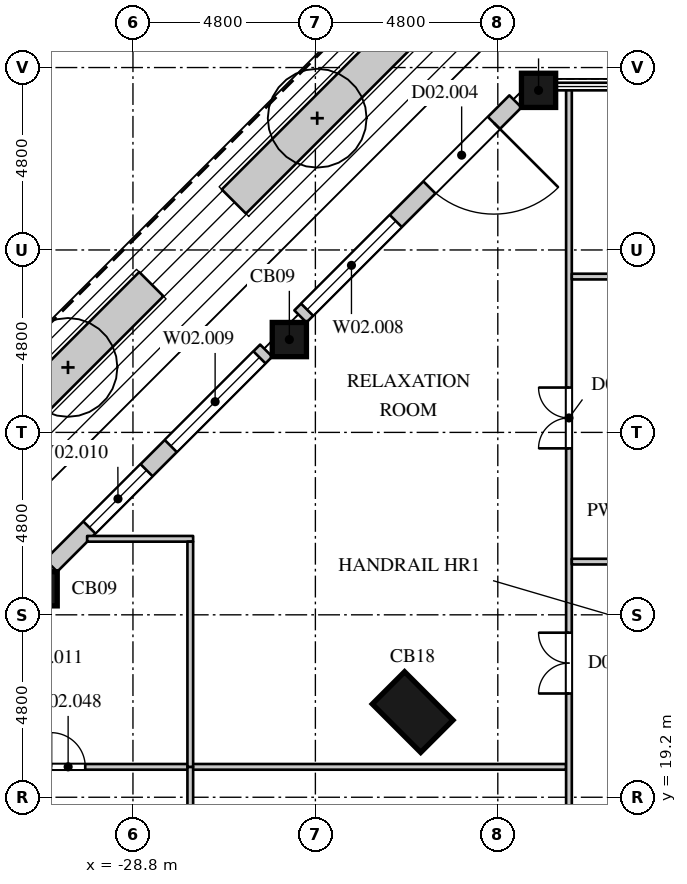
"""IFC4 building model, lengths in metres.
Left out: names, types, materials, properties, quantities, classifications, styles, units other than length and angle.
Written with IfcOpenShell. Run it as: python <this file> out.ifc"""

import sys

from ifc_helpers import new_model, si_unit, direction, frame, frame_2d, origin, origin_2d, place, context, subcontext, project, spatial, rectangle, extrude, element, fill, save


model = new_model("IFC4")
c1 = context("Model", 3, precision=1e-05, world=origin(), true_north=direction((0.0, 1.0)))
c2 = subcontext(c1, "Body", "Model", "MODEL_VIEW")
j1 = project(units=[si_unit("LENGTHUNIT", "METRE"), si_unit("PLANEANGLEUNIT", "RADIAN")], contexts=[c1])
p1 = place(None, origin())
s1 = spatial("IfcSite", under=j1, at=p1, CompositionType="ELEMENT")
p2 = place(p1, origin())
s2 = spatial("IfcBuilding", under=s1, at=p2, CompositionType="ELEMENT")
p3 = place(p2, frame((0.0, 0.0, 11.0)))
s3 = spatial("IfcBuildingStorey", under=s2, at=p3, CompositionType="ELEMENT", Elevation=11.0)
p4 = place(p3, frame((-21.441, 21.441, 0.0), z_axis=(0.0, 0.0, 1.0), x_axis=(-0.707106781187, -0.707106781187, 0.0)))
e1 = element("IfcColumn", 1, at=p4, inside=s3, PredefinedType="COLUMN", context=c2, shape_type="SweptSolid", body=[
    extrude(rectangle(XDim=1.2, YDim=1.8, at=origin_2d()), origin(), (0.0, 0.0, 1.0), 5.0),
])
for number, where, z_axis, x_axis in (
    (2, (-31.243, 24.685, 0.0), (0.0, 0.0, 1.0), (1.0, 0.0, 0.0)),
    (3, (-24.685, 31.243, 0.0), (0.0, 0.0, 1.0), (1.0, 0.0, 0.0)),
    (4, (-18.128, 37.8, 0.0), (0.0, 0.0, 1.0), (1.0, 0.0, 0.0)),
):
    element("IfcColumn", number, at=place(p3, frame(where, z_axis=z_axis, x_axis=x_axis)), inside=s3, PredefinedType="COLUMN", context=c2, shape_type="SweptSolid", body=[
        extrude(rectangle(XDim=0.9, YDim=0.9, at=origin_2d()), origin(), (0.0, 0.0, 1.0), 5.0),
    ])
p5 = place(p3, frame((-18.737, 37.509, 0.0), z_axis=(0.0, 0.0, 1.0), x_axis=(-0.707106781187, -0.707106781187, 0.0)))
e5 = element("IfcWall", 5, at=p5, inside=s3, PredefinedType="ELEMENTEDWALL", context=c2, shape_type="SweptSolid", body=[
    extrude(rectangle(XDim=8.0, YDim=0.45, at=frame_2d((4.0, 0.0))), origin(), (0.0, 0.0, 1.0), 3.8),
])
p6 = place(p5, frame((0.8, 0.0, 0.0)))
e6 = element("IfcOpeningElement", 6, at=p6, cuts=e5, PredefinedType="OPENING", context=c2, shape_type="SweptSolid", body=[
    extrude(rectangle(XDim=2.4, YDim=2.7, at=frame_2d((1.2, 1.35))), frame((0.0, 0.235, 0.0), z_axis=(0.0, -1.0, 0.0), x_axis=(1.0, 0.0, 0.0)), (0.0, 0.0, 1.0), 0.47),
])
p7 = place(p5, frame((4.45, 0.0, 1.05)))
e7 = element("IfcOpeningElement", 7, at=p7, cuts=e5, PredefinedType="OPENING", context=c2, shape_type="SweptSolid", body=[
    extrude(rectangle(XDim=3.3, YDim=2.7, at=frame_2d((1.65, 1.35))), frame((0.0, 0.235, 0.0), z_axis=(0.0, -1.0, 0.0), x_axis=(1.0, 0.0, 0.0)), (0.0, 0.0, 1.0), 0.47),
])
p8 = place(p3, frame((-25.294, 30.952, 0.0), z_axis=(0.0, 0.0, 1.0), x_axis=(-0.707106781187, -0.707106781187, 0.0)))
e8 = element("IfcWall", 8, at=p8, inside=s3, PredefinedType="ELEMENTEDWALL", context=c2, shape_type="SweptSolid", body=[
    extrude(rectangle(XDim=8.0, YDim=0.45, at=frame_2d((4.0, 0.0))), origin(), (0.0, 0.0, 1.0), 3.8),
])
p9 = place(p8, frame((0.25, 0.0, 1.05)))
e9 = element("IfcOpeningElement", 9, at=p9, cuts=e8, PredefinedType="OPENING", context=c2, shape_type="SweptSolid", body=[
    extrude(rectangle(XDim=3.3, YDim=2.7, at=frame_2d((1.65, 1.35))), frame((0.0, 0.235, 0.0), z_axis=(0.0, -1.0, 0.0), x_axis=(1.0, 0.0, 0.0)), (0.0, 0.0, 1.0), 0.47),
])
p10 = place(p8, frame((4.45, 0.0, 1.05)))
e10 = element("IfcOpeningElement", 10, at=p10, cuts=e8, PredefinedType="OPENING", context=c2, shape_type="SweptSolid", body=[
    extrude(rectangle(XDim=2.13, YDim=2.7, at=frame_2d((1.065, 1.35))), frame((0.0, 0.235, 0.0), z_axis=(0.0, -1.0, 0.0), x_axis=(1.0, 0.0, 0.0)), (0.0, 0.0, 1.0), 0.47),
])
p11 = place(p3, frame((-21.76, 39.259, 0.0), z_axis=(0.0, 0.0, 1.0), x_axis=(-0.707087094764, -0.707126467061, 0.0)))
e11 = element("IfcWall", 11, at=p11, inside=s3, PredefinedType="USERDEFINED", context=c2, shape_type="SweptSolid", body=[
    extrude(rectangle(XDim=6.201, YDim=0.9, at=frame_2d((3.101, 0.0))), origin(), (0.0, 0.0, 1.0), 0.9),
])
p12 = place(p3, frame((-28.317, 32.702, 0.0), z_axis=(0.0, 0.0, 1.0), x_axis=(-0.707106781187, -0.707106781187, 0.0)))
e12 = element("IfcWall", 12, at=p12, inside=s3, PredefinedType="USERDEFINED", context=c2, shape_type="SweptSolid", body=[
    extrude(rectangle(XDim=6.201, YDim=0.9, at=frame_2d((3.1, 0.0))), origin(), (0.0, 0.0, 1.0), 0.9),
])
p13 = place(p3, frame((-36.006, 20.0, 0.0), z_axis=(0.0, 0.0, 1.0), x_axis=(1.0, 0.0, 0.0)))
e13 = element("IfcWall", 13, at=p13, inside=s3, PredefinedType="PARTITIONING", context=c2, shape_type="SweptSolid", body=[
    extrude(rectangle(XDim=18.603, YDim=0.15, at=frame_2d((9.301, 0.0))), origin(), (0.0, 0.0, 1.0), 4.65),
])
p14 = place(p13, frame((1.2, 0.0, 0.0)))
e14 = element("IfcOpeningElement", 14, at=p14, cuts=e13, PredefinedType="OPENING", context=c2, shape_type="SweptSolid", body=[
    extrude(rectangle(XDim=0.9, YDim=2.2, at=frame_2d((0.45, 1.1))), frame((0.0, 0.085, 0.0), z_axis=(0.0, -1.0, 0.0), x_axis=(1.0, 0.0, 0.0)), (0.0, 0.0, 1.0), 0.17),
])
p15 = place(p13, frame((5.05, 0.0, 0.0)))
e15 = element("IfcOpeningElement", 15, at=p15, cuts=e13, PredefinedType="OPENING", context=c2, shape_type="SweptSolid", body=[
    extrude(rectangle(XDim=0.9, YDim=2.2, at=frame_2d((0.45, 1.1))), frame((0.0, 0.085, 0.0), z_axis=(0.0, -1.0, 0.0), x_axis=(1.0, 0.0, 0.0)), (0.0, 0.0, 1.0), 0.17),
])
p16 = place(p3, frame((-30.006, 26.0, 0.0), z_axis=(0.0, 0.0, 1.0), x_axis=(1.0, 0.0, 0.0)))
e16 = element("IfcWall", 16, at=p16, inside=s3, PredefinedType="PARTITIONING", context=c2, shape_type="SweptSolid", body=[
    extrude(rectangle(XDim=2.789, YDim=0.15, at=frame_2d((1.395, 0.0))), origin(), (0.0, 0.0, 1.0), 4.65),
])
p17 = place(p3, frame((-27.292, 11.325, 0.0), z_axis=(0.0, 0.0, 1.0), x_axis=(0.0, 1.0, 0.0)))
e17 = element("IfcWall", 17, at=p17, inside=s3, PredefinedType="PARTITIONING", context=c2, shape_type="SweptSolid", body=[
    extrude(rectangle(XDim=8.675, YDim=0.15, at=frame_2d((4.337, 0.0))), origin(), (0.0, 0.0, 1.0), 4.65),
])
p18 = place(p3, frame((-27.292, 20.0, 0.0), z_axis=(0.0, 0.0, 1.0), x_axis=(0.0, 1.0, 0.0)))
e18 = element("IfcWall", 18, at=p18, inside=s3, PredefinedType="PARTITIONING", context=c2, shape_type="SweptSolid", body=[
    extrude(rectangle(XDim=5.925, YDim=0.15, at=frame_2d((2.962, 0.0))), origin(), (0.0, 0.0, 1.0), 4.65),
])
p19 = place(p3, frame((-17.328, 15.58, 0.0), z_axis=(0.0, 0.0, 1.0), x_axis=(0.0, 1.0, 0.0)))
e19 = element("IfcWall", 19, at=p19, inside=s3, PredefinedType="PARTITIONING", context=c2, shape_type="SweptSolid", body=[
    extrude(rectangle(XDim=22.275, YDim=0.15, at=frame_2d((11.137, 0.0))), origin(), (0.0, 0.0, 1.0), 4.65),
])
p20 = place(p19, frame((12.8, 0.0, 0.0)))
e20 = element("IfcOpeningElement", 20, at=p20, cuts=e19, PredefinedType="OPENING", context=c2, shape_type="SweptSolid", body=[
    extrude(rectangle(XDim=1.6, YDim=2.4, at=frame_2d((0.8, 1.2))), frame((0.0, 0.085, 0.0), z_axis=(0.0, -1.0, 0.0), x_axis=(1.0, 0.0, 0.0)), (0.0, 0.0, 1.0), 0.17),
])
p21 = place(p19, frame((6.35, 0.0, 0.0)))
e21 = element("IfcOpeningElement", 21, at=p21, cuts=e19, PredefinedType="OPENING", context=c2, shape_type="SweptSolid", body=[
    extrude(rectangle(XDim=1.6, YDim=2.4, at=frame_2d((0.8, 1.2))), frame((0.0, 0.085, 0.0), z_axis=(0.0, -1.0, 0.0), x_axis=(1.0, 0.0, 0.0)), (0.0, 0.0, 1.0), 0.17),
])
p22 = place(p3, frame((-17.253, 25.4, 0.0), z_axis=(0.0, 0.0, 1.0), x_axis=(1.0, 0.0, 0.0)))
e22 = element("IfcWall", 22, at=p22, inside=s3, PredefinedType="PARTITIONING", context=c2, shape_type="SweptSolid", body=[
    extrude(rectangle(XDim=5.928, YDim=0.15, at=frame_2d((2.964, 0.0))), origin(), (0.0, 0.0, 1.0), 4.65),
])
p23 = place(p3, frame((-17.253, 32.9, 0.0), z_axis=(0.0, 0.0, 1.0), x_axis=(1.0, 0.0, 0.0)))
e23 = element("IfcWall", 23, at=p23, inside=s3, PredefinedType="PARTITIONING", context=c2, shape_type="SweptSolid", body=[
    extrude(rectangle(XDim=0.989, YDim=0.15, at=frame_2d((0.495, 0.0))), origin(), (0.0, 0.0, 1.0), 4.65),
])
p24 = place(p6, origin())
e24 = element("IfcDoor", 24, at=p24, inside=s3, OperationType="SINGLE_SWING_LEFT", PredefinedType="DOOR", context=c2, shape_type="SweptSolid", body=[
    extrude(rectangle(XDim=2.4, YDim=2.7, at=frame_2d((1.2, 1.35))), frame((0.0, 0.13, 0.0), z_axis=(0.0, -1.0, 0.0), x_axis=(1.0, 0.0, 0.0)), (0.0, 0.0, 1.0), 0.05),
])
fill(e6, e24)
p25 = place(p7, origin())
e25 = element("IfcWindow", 25, at=p25, inside=s3, PartitioningType="SINGLE_PANEL", PredefinedType="WINDOW", context=c2, shape_type="SweptSolid", body=[
    extrude(rectangle(XDim=3.3, YDim=2.7, at=frame_2d((1.65, 1.35))), frame((0.0, 0.135, 0.0), z_axis=(0.0, -1.0, 0.0), x_axis=(1.0, 0.0, 0.0)), (0.0, 0.0, 1.0), 0.06),
])
fill(e7, e25)
p26 = place(p9, origin())
e26 = element("IfcWindow", 26, at=p26, inside=s3, PartitioningType="SINGLE_PANEL", PredefinedType="WINDOW", context=c2, shape_type="SweptSolid", body=[
    extrude(rectangle(XDim=3.3, YDim=2.7, at=frame_2d((1.65, 1.35))), frame((0.0, 0.135, 0.0), z_axis=(0.0, -1.0, 0.0), x_axis=(1.0, 0.0, 0.0)), (0.0, 0.0, 1.0), 0.06),
])
fill(e9, e26)
p27 = place(p10, origin())
e27 = element("IfcWindow", 27, at=p27, inside=s3, PartitioningType="SINGLE_PANEL", PredefinedType="WINDOW", context=c2, shape_type="SweptSolid", body=[
    extrude(rectangle(XDim=2.13, YDim=2.7, at=frame_2d((1.065, 1.35))), frame((0.0, 0.135, 0.0), z_axis=(0.0, -1.0, 0.0), x_axis=(1.0, 0.0, 0.0)), (0.0, 0.0, 1.0), 0.06),
])
fill(e10, e27)
p28 = place(p20, origin())
e28 = element("IfcDoor", 28, at=p28, inside=s3, OperationType="DOUBLE_DOOR_SINGLE_SWING", PredefinedType="DOOR", context=c2, shape_type="SweptSolid", body=[
    extrude(rectangle(XDim=1.6, YDim=2.4, at=frame_2d((0.8, 1.2))), frame((0.0, 0.025, 0.0), z_axis=(0.0, -1.0, 0.0), x_axis=(1.0, 0.0, 0.0)), (0.0, 0.0, 1.0), 0.05),
])
fill(e20, e28)
p29 = place(p15, origin())
e29 = element("IfcDoor", 29, at=p29, inside=s3, OperationType="SINGLE_SWING_LEFT", PredefinedType="DOOR", context=c2, shape_type="SweptSolid", body=[
    extrude(rectangle(XDim=0.9, YDim=2.2, at=frame_2d((0.45, 1.1))), frame((0.0, 0.025, 0.0), z_axis=(0.0, -1.0, 0.0), x_axis=(1.0, 0.0, 0.0)), (0.0, 0.0, 1.0), 0.05),
])
fill(e15, e29)
p30 = place(p21, origin())
e30 = element("IfcDoor", 30, at=p30, inside=s3, OperationType="DOUBLE_DOOR_SINGLE_SWING", PredefinedType="DOOR", context=c2, shape_type="SweptSolid", body=[
    extrude(rectangle(XDim=1.6, YDim=2.4, at=frame_2d((0.8, 1.2))), frame((0.0, 0.025, 0.0), z_axis=(0.0, -1.0, 0.0), x_axis=(1.0, 0.0, 0.0)), (0.0, 0.0, 1.0), 0.05),
])
fill(e21, e30)
save(model, sys.argv[1])
